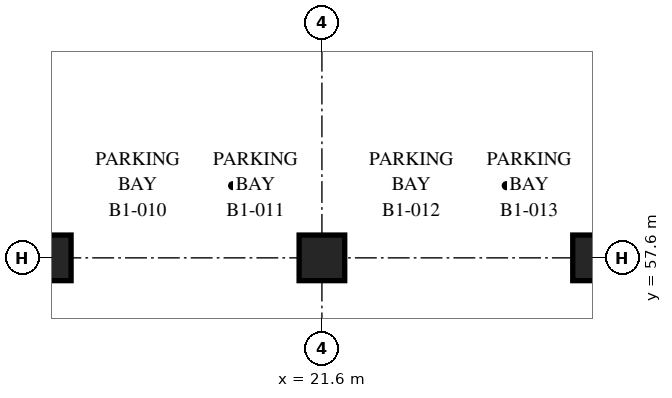
"""IFC4 building model, lengths in metres.
Left out: names, types, materials, properties, quantities, classifications, styles, units other than length and angle.
Written with IfcOpenShell. Run it as: python <this file> out.ifc"""

import sys

from ifc_helpers import new_model, si_unit, direction, frame, origin, origin_2d, place, context, subcontext, project, spatial, rectangle, extrude, element, save


model = new_model("IFC4")
c1 = context("Model", 3, precision=1e-05, world=origin(), true_north=direction((0.0, 1.0)))
c2 = subcontext(c1, "Body", "Model", "MODEL_VIEW")
j1 = project(units=[si_unit("LENGTHUNIT", "METRE"), si_unit("PLANEANGLEUNIT", "RADIAN")], contexts=[c1])
p1 = place(None, origin())
s1 = spatial("IfcSite", under=j1, at=p1, CompositionType="ELEMENT")
p2 = place(p1, origin())
s2 = spatial("IfcBuilding", under=s1, at=p2, CompositionType="ELEMENT")
p3 = place(p2, frame((0.0, 0.0, -4.5)))
s3 = spatial("IfcBuildingStorey", under=s2, at=p3, CompositionType="ELEMENT", Elevation=-4.5)
for number, where, z_axis, x_axis in (
    (1, (14.4, 57.6, 0.0), (0.0, 0.0, 1.0), (1.0, 0.0, 0.0)),
    (2, (21.6, 57.6, 0.0), (0.0, 0.0, 1.0), (1.0, 0.0, 0.0)),
    (3, (28.8, 57.6, 0.0), (0.0, 0.0, 1.0), (1.0, 0.0, 0.0)),
):
    element("IfcColumn", number, at=place(p3, frame(where, z_axis=z_axis, x_axis=x_axis)), inside=s3, PredefinedType="COLUMN", context=c2, shape_type="SweptSolid", body=[
        extrude(rectangle(XDim=1.2, YDim=1.2, at=origin_2d()), origin(), (0.0, 0.0, 1.0), 4.1),
    ])
save(model, sys.argv[1])
